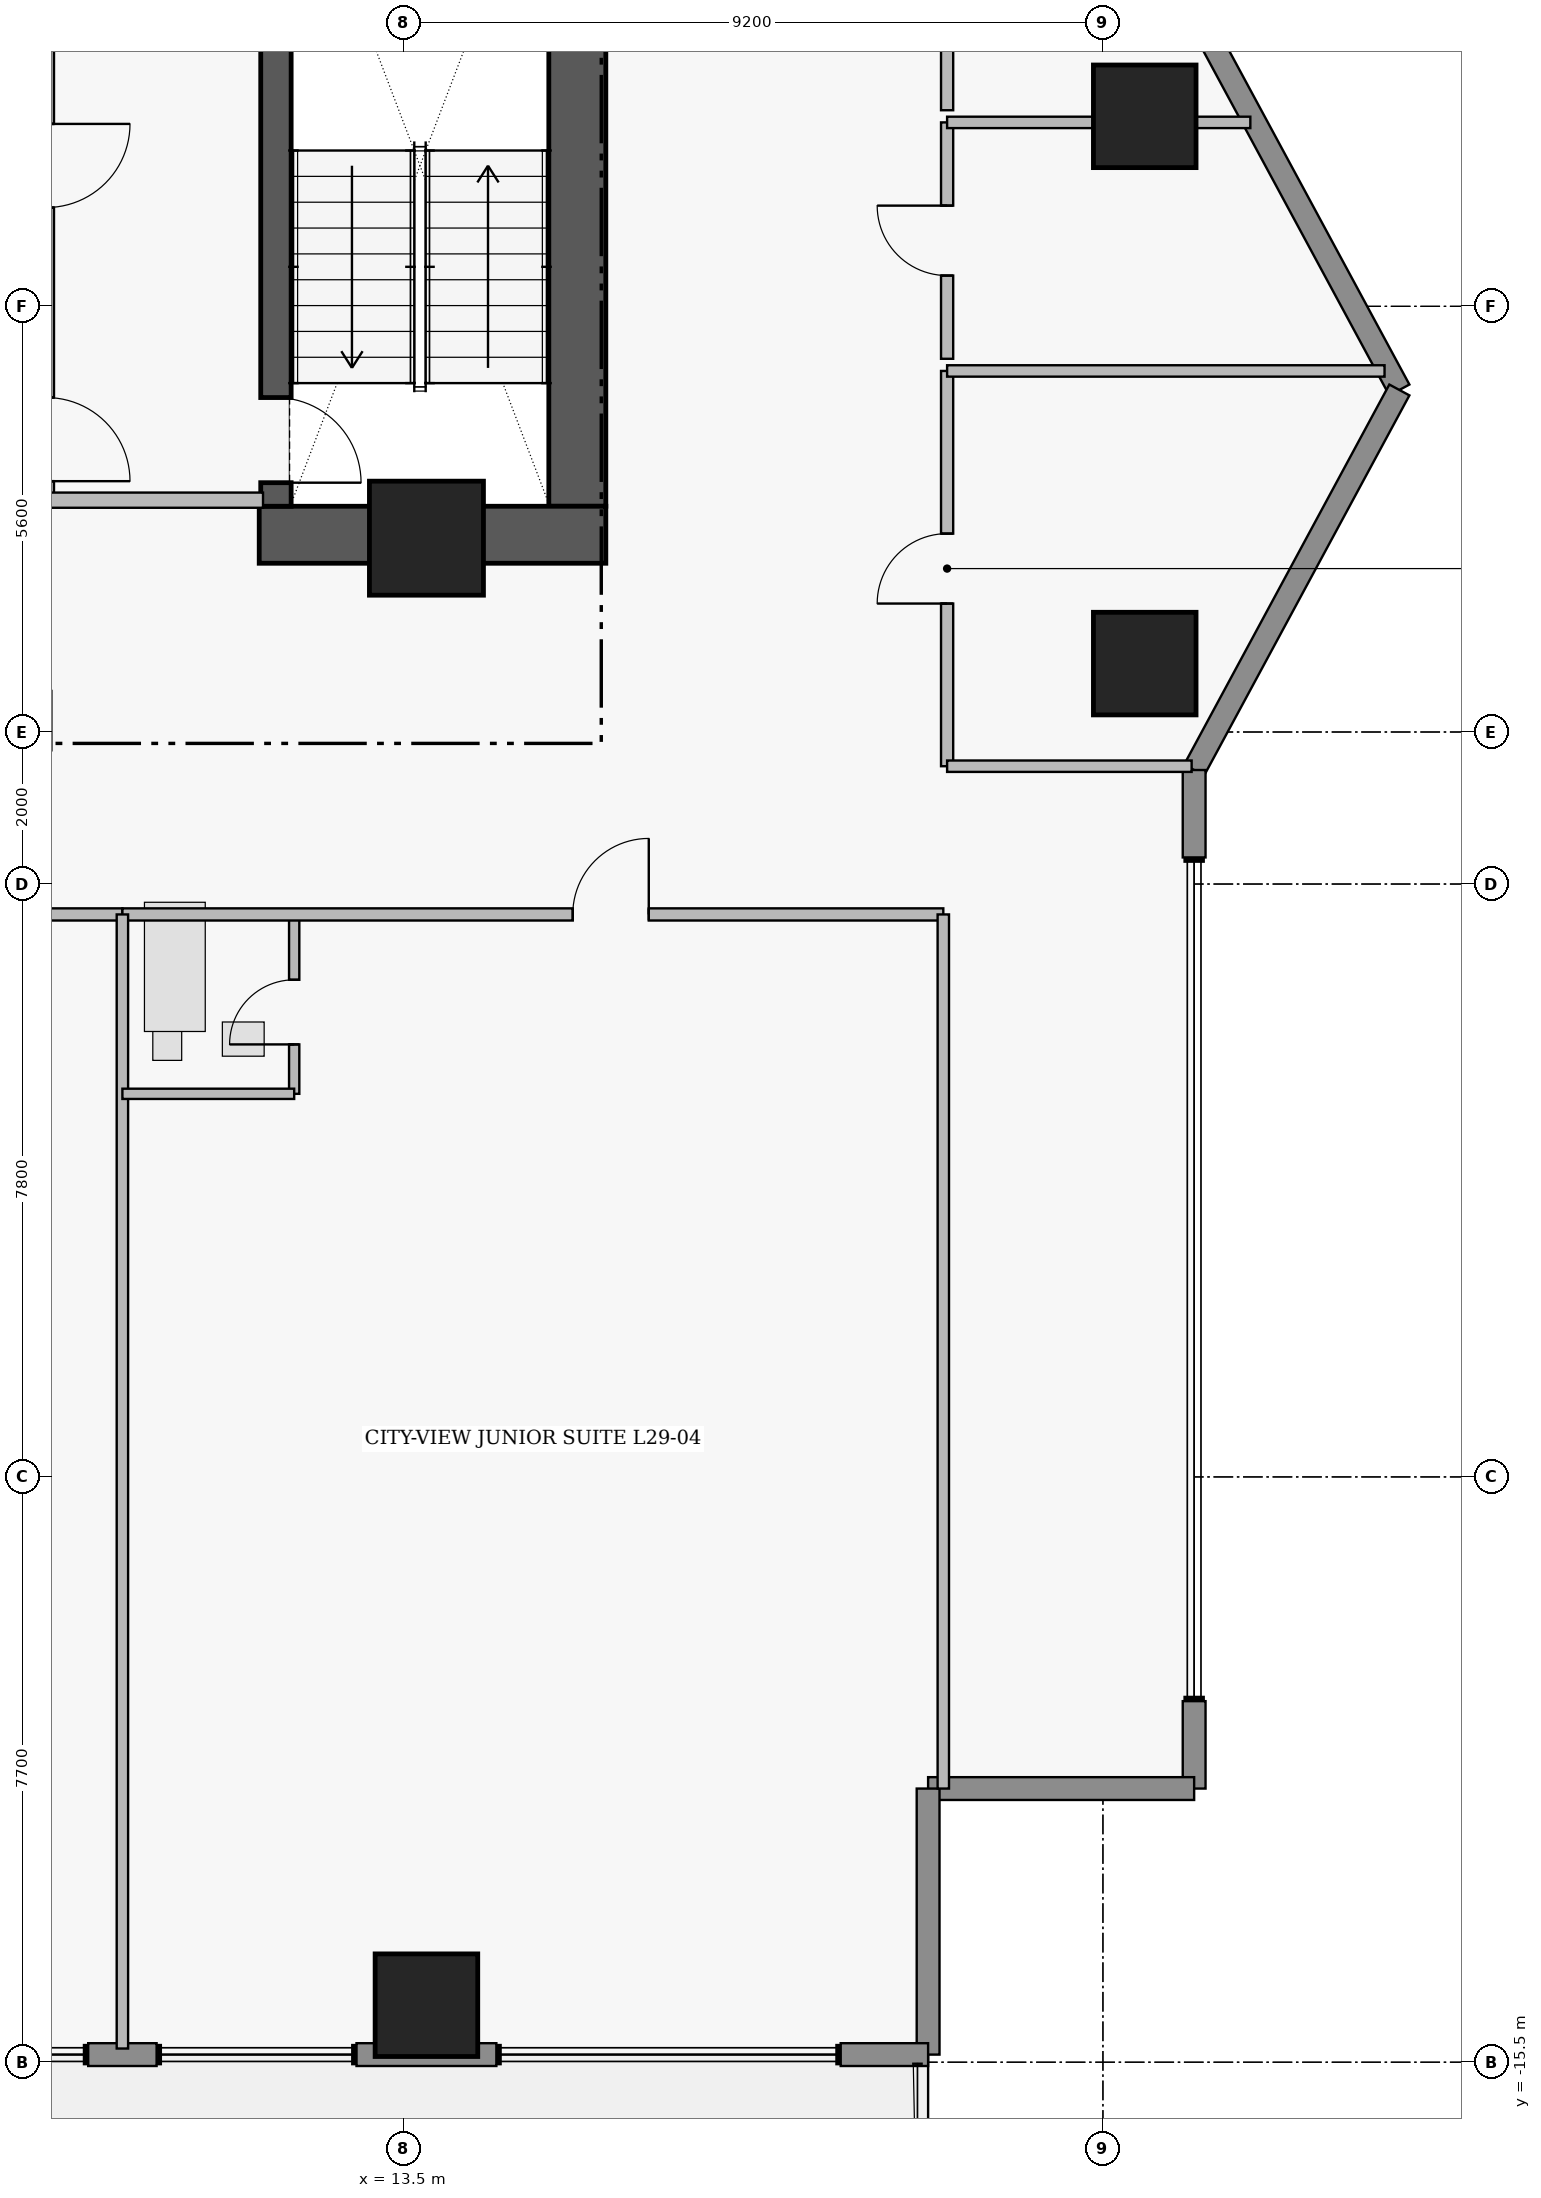
"""IFC4 building model, lengths in metres.
Left out: names, types, materials, properties, quantities, classifications, styles, units other than length and angle.
Written with IfcOpenShell. Run it as: python <this file> out.ifc"""

import sys

from ifc_helpers import new_model, si_unit, direction, frame, frame_2d, origin, origin_2d, place, context, subcontext, project, spatial, rectangle, extrude, element, fill, save


model = new_model("IFC4")
c1 = context("Model", 3, precision=1e-05, world=origin(), true_north=direction((0.0, 1.0)))
c2 = subcontext(c1, "Body", "Model", "MODEL_VIEW")
j1 = project(units=[si_unit("LENGTHUNIT", "METRE"), si_unit("PLANEANGLEUNIT", "RADIAN")], contexts=[c1])
p1 = place(None, origin())
s1 = spatial("IfcSite", under=j1, at=p1, CompositionType="ELEMENT")
p2 = place(p1, origin())
s2 = spatial("IfcBuilding", under=s1, at=p2, CompositionType="ELEMENT")
p3 = place(p2, frame((0.0, 0.0, 117.55)))
s3 = spatial("IfcBuildingStorey", under=s2, at=p3, CompositionType="ELEMENT", Elevation=117.55)
p4 = place(p3, frame((15.785, 4.97, 0.0), z_axis=(0.0, 0.0, 1.0), x_axis=(0.0, 1.0, 0.0)))
e1 = element("IfcWall", 1, at=p4, inside=s3, PredefinedType="SHEAR", context=c2, shape_type="SweptSolid", body=[
    extrude(rectangle(XDim=8.96, YDim=0.75, at=frame_2d((4.48, 0.0))), origin(), (0.0, 0.0, 1.0), 3.46),
])
p5 = place(p3, frame((11.6, 4.595, 0.0), z_axis=(0.0, 0.0, 1.0), x_axis=(1.0, 0.0, 0.0)))
e2 = element("IfcWall", 2, at=p5, inside=s3, PredefinedType="SHEAR", context=c2, shape_type="SweptSolid", body=[
    extrude(rectangle(XDim=4.56, YDim=0.75, at=frame_2d((2.28, 0.0))), origin(), (0.0, 0.0, 1.0), 3.46),
])
p6 = place(p3, frame((11.82, 13.93, 0.0), z_axis=(0.0, 0.0, 1.0), x_axis=(0.0, -1.0, 0.0)))
e3 = element("IfcWall", 3, at=p6, inside=s3, PredefinedType="SHEAR", context=c2, shape_type="SweptSolid", body=[
    extrude(rectangle(XDim=8.96, YDim=0.4, at=frame_2d((4.48, 0.0))), origin(), (0.0, 0.0, 1.0), 3.46),
])
p7 = place(p6, frame((7.53, 0.0, 0.0)))
e4 = element("IfcOpeningElement", 4, at=p7, cuts=e3, PredefinedType="OPENING", context=c2, shape_type="SweptSolid", body=[
    extrude(rectangle(XDim=1.12, YDim=2.22, at=frame_2d((0.56, 1.11))), frame((0.0, 0.21, 0.0), z_axis=(0.0, -1.0, 0.0), x_axis=(1.0, 0.0, 0.0)), (0.0, 0.0, 1.0), 0.42),
])
p8 = place(p3, frame((13.8, 4.55, 0.0), z_axis=(0.0, 0.0, 1.0), x_axis=(1.0, 0.0, 0.0)))
e5 = element("IfcColumn", 5, at=p8, inside=s3, PredefinedType="COLUMN", context=c2, shape_type="SweptSolid", body=[
    extrude(rectangle(XDim=1.5, YDim=1.5, at=origin_2d()), origin(), (0.0, 0.0, 1.0), 3.65),
])
for number, where, z_axis, x_axis in (
    (6, (13.8, -14.75, 0.0), (0.0, 0.0, 1.0), (1.0, 0.0, 0.0)),
    (7, (23.25, 2.9, 0.0), (0.0, 0.0, 1.0), (1.0, 0.0, 0.0)),
    (8, (23.25, 10.1, 0.0), (0.0, 0.0, 1.0), (1.0, 0.0, 0.0)),
):
    element("IfcColumn", number, at=place(p3, frame(where, z_axis=z_axis, x_axis=x_axis)), inside=s3, PredefinedType="COLUMN", context=c2, shape_type="SweptSolid", body=[
        extrude(rectangle(XDim=1.35, YDim=1.35, at=origin_2d()), origin(), (0.0, 0.0, 1.0), 3.65),
    ])
for number, where, z_axis, x_axis in (
    (9, (23.9, 11.5, 0.0), (0.0, 0.0, 1.0), (0.475, -0.88, 0.0)),
    (10, (26.6, 6.5, 0.0), (0.0, 0.0, 1.0), (-0.475, -0.88, 0.0)),
):
    element("IfcWall", number, at=place(p3, frame(where, z_axis=z_axis, x_axis=x_axis)), inside=s3, PredefinedType="STANDARD", context=c2, shape_type="SweptSolid", body=[
        extrude(rectangle(XDim=5.683, YDim=0.3, at=frame_2d((2.841, 0.0))), origin(), (0.0, 0.0, 1.0), 3.43),
    ])
for number, where, z_axis, x_axis in (
    (11, (23.9, 1.5, 0.0), (0.0, 0.0, 1.0), (0.0, -1.0, 0.0)),
    (12, (23.9, -10.75, 0.0), (0.0, 0.0, 1.0), (0.0, -1.0, 0.0)),
):
    element("IfcWall", number, at=place(p3, frame(where, z_axis=z_axis, x_axis=x_axis)), inside=s3, PredefinedType="STANDARD", context=c2, shape_type="SweptSolid", body=[
        extrude(rectangle(XDim=1.15, YDim=0.3, at=frame_2d((0.575, 0.0))), origin(), (0.0, 0.0, 1.0), 3.43),
    ])
for number, where, z_axis, x_axis in (
    (13, (23.9, -11.9, 0.0), (0.0, 0.0, 1.0), (-1.0, 0.0, 0.0)),
    (14, (20.4, -11.9, 0.0), (0.0, 0.0, 1.0), (0.0, -1.0, 0.0)),
):
    element("IfcWall", number, at=place(p3, frame(where, z_axis=z_axis, x_axis=x_axis)), inside=s3, PredefinedType="STANDARD", context=c2, shape_type="SweptSolid", body=[
        extrude(rectangle(XDim=3.5, YDim=0.3, at=frame_2d((1.75, 0.0))), origin(), (0.0, 0.0, 1.0), 3.43),
    ])
p9 = place(p3, frame((20.4, -15.4, 0.0), z_axis=(0.0, 0.0, 1.0), x_axis=(-1.0, 0.0, 0.0)))
e15 = element("IfcWall", 15, at=p9, inside=s3, PredefinedType="STANDARD", context=c2, shape_type="SweptSolid", body=[
    extrude(rectangle(XDim=1.15, YDim=0.3, at=frame_2d((0.575, 0.0))), origin(), (0.0, 0.0, 1.0), 3.43),
])
p10 = place(p3, frame((14.72, -15.4, 0.0), z_axis=(0.0, 0.0, 1.0), x_axis=(-1.0, 0.0, 0.0)))
e16 = element("IfcWall", 16, at=p10, inside=s3, PredefinedType="STANDARD", context=c2, shape_type="SweptSolid", body=[
    extrude(rectangle(XDim=1.84, YDim=0.3, at=frame_2d((0.92, 0.0))), origin(), (0.0, 0.0, 1.0), 3.43),
])
p11 = place(p3, frame((10.25, -15.4, 0.0), z_axis=(0.0, 0.0, 1.0), x_axis=(-1.0, 0.0, 0.0)))
e17 = element("IfcWall", 17, at=p11, inside=s3, PredefinedType="STANDARD", context=c2, shape_type="SweptSolid", body=[
    extrude(rectangle(XDim=0.9, YDim=0.3, at=frame_2d((0.45, 0.0))), origin(), (0.0, 0.0, 1.0), 3.43),
])
p12 = place(p3, frame((8.8, 11.15, 0.0), z_axis=(0.0, 0.0, 1.0), x_axis=(0.0, -1.0, 0.0)))
e18 = element("IfcWall", 18, at=p12, inside=s3, PredefinedType="PARTITIONING", context=c2, shape_type="SweptSolid", body=[
    extrude(rectangle(XDim=6.1, YDim=0.2, at=frame_2d((3.05, 0.0))), origin(), (0.0, 0.0, 1.0), 3.43),
])
p13 = place(p12, frame((1.15, 0.0, 0.0)))
e19 = element("IfcOpeningElement", 19, at=p13, cuts=e18, PredefinedType="OPENING", context=c2, shape_type="SweptSolid", body=[
    extrude(rectangle(XDim=1.1, YDim=2.2, at=frame_2d((0.55, 1.1))), frame((0.0, 0.11, 0.0), z_axis=(0.0, -1.0, 0.0), x_axis=(1.0, 0.0, 0.0)), (0.0, 0.0, 1.0), 0.22),
])
p14 = place(p12, frame((4.75, 0.0, 0.0)))
e20 = element("IfcOpeningElement", 20, at=p14, cuts=e18, PredefinedType="OPENING", context=c2, shape_type="SweptSolid", body=[
    extrude(rectangle(XDim=1.1, YDim=2.2, at=frame_2d((0.55, 1.1))), frame((0.0, 0.11, 0.0), z_axis=(0.0, -1.0, 0.0), x_axis=(1.0, 0.0, 0.0)), (0.0, 0.0, 1.0), 0.22),
])
p15 = place(p3, frame((0.4, -0.4, 0.0), z_axis=(0.0, 0.0, 1.0), x_axis=(1.0, 0.0, 0.0)))
e21 = element("IfcWall", 21, at=p15, inside=s3, PredefinedType="PARTITIONING", context=c2, shape_type="SweptSolid", body=[
    extrude(rectangle(XDim=9.4, YDim=0.16, at=frame_2d((4.7, 0.0))), origin(), (0.0, 0.0, 1.0), 3.43),
])
p16 = place(p15, frame((5.35, 0.0, 0.0)))
e22 = element("IfcOpeningElement", 22, at=p16, cuts=e21, PredefinedType="OPENING", context=c2, shape_type="SweptSolid", body=[
    extrude(rectangle(XDim=1.0, YDim=2.15, at=frame_2d((0.5, 1.075))), frame((0.0, 0.09, 0.0), z_axis=(0.0, -1.0, 0.0), x_axis=(1.0, 0.0, 0.0)), (0.0, 0.0, 1.0), 0.18),
])
p17 = place(p3, frame((12.06, -2.76, 0.0), z_axis=(0.0, 0.0, 1.0), x_axis=(0.0, 1.0, 0.0)))
e23 = element("IfcWall", 23, at=p17, inside=s3, PredefinedType="PLUMBINGWALL", context=c2, shape_type="SweptSolid", body=[
    extrude(rectangle(XDim=2.36, YDim=0.135, at=frame_2d((1.18, 0.0))), origin(), (0.0, 0.0, 1.0), 3.43),
])
p18 = place(p17, frame((0.65, 0.0, 0.0)))
e24 = element("IfcOpeningElement", 24, at=p18, cuts=e23, PredefinedType="OPENING", context=c2, shape_type="SweptSolid", body=[
    extrude(rectangle(XDim=0.85, YDim=2.1, at=frame_2d((0.425, 1.05))), frame((0.0, 0.077, 0.0), z_axis=(0.0, -1.0, 0.0), x_axis=(1.0, 0.0, 0.0)), (0.0, 0.0, 1.0), 0.155),
])
p19 = place(p3, frame((9.8, -0.4, 0.0), z_axis=(0.0, 0.0, 1.0), x_axis=(1.0, 0.0, 0.0)))
e25 = element("IfcWall", 25, at=p19, inside=s3, PredefinedType="PARTITIONING", context=c2, shape_type="SweptSolid", body=[
    extrude(rectangle(XDim=10.8, YDim=0.16, at=frame_2d((5.4, 0.0))), origin(), (0.0, 0.0, 1.0), 3.43),
])
p20 = place(p19, frame((5.925, 0.0, 0.0)))
e26 = element("IfcOpeningElement", 26, at=p20, cuts=e25, PredefinedType="OPENING", context=c2, shape_type="SweptSolid", body=[
    extrude(rectangle(XDim=1.0, YDim=2.15, at=frame_2d((0.5, 1.075))), frame((0.0, 0.09, 0.0), z_axis=(0.0, -1.0, 0.0), x_axis=(1.0, 0.0, 0.0)), (0.0, 0.0, 1.0), 0.18),
])
p21 = place(p3, frame((20.65, 1.55, 0.0), z_axis=(0.0, 0.0, 1.0), x_axis=(0.0, 1.0, 0.0)))
e27 = element("IfcWall", 27, at=p21, inside=s3, PredefinedType="PARTITIONING", context=c2, shape_type="SweptSolid", body=[
    extrude(rectangle(XDim=5.2, YDim=0.16, at=frame_2d((2.6, 0.0))), origin(), (0.0, 0.0, 1.0), 3.43),
])
p22 = place(p21, frame((2.14, 0.0, 0.0)))
e28 = element("IfcOpeningElement", 28, at=p22, cuts=e27, PredefinedType="OPENING", context=c2, shape_type="SweptSolid", body=[
    extrude(rectangle(XDim=0.92, YDim=2.12, at=frame_2d((0.46, 1.06))), frame((0.0, 0.09, 0.0), z_axis=(0.0, -1.0, 0.0), x_axis=(1.0, 0.0, 0.0)), (0.0, 0.0, 1.0), 0.18),
])
p23 = place(p3, frame((20.65, 6.91, 0.0), z_axis=(0.0, 0.0, 1.0), x_axis=(0.0, 1.0, 0.0)))
e29 = element("IfcWall", 29, at=p23, inside=s3, PredefinedType="PARTITIONING", context=c2, shape_type="SweptSolid", body=[
    extrude(rectangle(XDim=3.11, YDim=0.16, at=frame_2d((1.555, 0.0))), origin(), (0.0, 0.0, 1.0), 3.43),
])
p24 = place(p23, frame((1.095, 0.0, 0.0)))
e30 = element("IfcOpeningElement", 30, at=p24, cuts=e29, PredefinedType="OPENING", context=c2, shape_type="SweptSolid", body=[
    extrude(rectangle(XDim=0.92, YDim=2.12, at=frame_2d((0.46, 1.06))), frame((0.0, 0.09, 0.0), z_axis=(0.0, -1.0, 0.0), x_axis=(1.0, 0.0, 0.0)), (0.0, 0.0, 1.0), 0.18),
])
p25 = place(p3, frame((20.65, 10.18, 0.0), z_axis=(0.0, 0.0, 1.0), x_axis=(0.0, 1.0, 0.0)))
e31 = element("IfcWall", 31, at=p25, inside=s3, PredefinedType="PARTITIONING", context=c2, shape_type="SweptSolid", body=[
    extrude(rectangle(XDim=4.67, YDim=0.16, at=frame_2d((2.335, 0.0))), origin(), (0.0, 0.0, 1.0), 3.43),
])
p26 = place(p25, frame((1.875, 0.0, 0.0)))
e32 = element("IfcOpeningElement", 32, at=p26, cuts=e31, PredefinedType="OPENING", context=c2, shape_type="SweptSolid", body=[
    extrude(rectangle(XDim=0.92, YDim=2.12, at=frame_2d((0.46, 1.06))), frame((0.0, 0.09, 0.0), z_axis=(0.0, -1.0, 0.0), x_axis=(1.0, 0.0, 0.0)), (0.0, 0.0, 1.0), 0.18),
])
p27 = place(p3, frame((8.8, 5.05, 0.0), z_axis=(0.0, 0.0, 1.0), x_axis=(1.0, 0.0, 0.0)))
e33 = element("IfcWall", 33, at=p27, inside=s3, PredefinedType="PARTITIONING", context=c2, shape_type="SweptSolid", body=[
    extrude(rectangle(XDim=2.85, YDim=0.2, at=frame_2d((1.425, 0.0))), origin(), (0.0, 0.0, 1.0), 3.43),
])
p28 = place(p3, frame((9.8, -15.32, 0.0), z_axis=(0.0, 0.0, 1.0), x_axis=(0.0, 1.0, 0.0)))
e34 = element("IfcWall", 34, at=p28, inside=s3, PredefinedType="PARTITIONING", context=c2, shape_type="SweptSolid", body=[
    extrude(rectangle(XDim=14.92, YDim=0.15, at=frame_2d((7.46, 0.0))), origin(), (0.0, 0.0, 1.0), 3.43),
])
p29 = place(p3, frame((9.8, -2.76, 0.0), z_axis=(0.0, 0.0, 1.0), x_axis=(1.0, 0.0, 0.0)))
e35 = element("IfcWall", 35, at=p29, inside=s3, PredefinedType="PLUMBINGWALL", context=c2, shape_type="SweptSolid", body=[
    extrude(rectangle(XDim=2.26, YDim=0.135, at=frame_2d((1.13, 0.0))), origin(), (0.0, 0.0, 1.0), 3.43),
])
p30 = place(p3, frame((20.6, -11.9, 0.0), z_axis=(0.0, 0.0, 1.0), x_axis=(0.0, 1.0, 0.0)))
e36 = element("IfcWall", 36, at=p30, inside=s3, PredefinedType="PARTITIONING", context=c2, shape_type="SweptSolid", body=[
    extrude(rectangle(XDim=11.5, YDim=0.15, at=frame_2d((5.75, 0.0))), origin(), (0.0, 0.0, 1.0), 3.43),
])
p31 = place(p3, frame((20.65, 1.55, 0.0), z_axis=(0.0, 0.0, 1.0), x_axis=(1.0, 0.0, 0.0)))
e37 = element("IfcWall", 37, at=p31, inside=s3, PredefinedType="PARTITIONING", context=c2, shape_type="SweptSolid", body=[
    extrude(rectangle(XDim=3.217, YDim=0.15, at=frame_2d((1.608, 0.0))), origin(), (0.0, 0.0, 1.0), 3.43),
])
p32 = place(p3, frame((20.65, 6.75, 0.0), z_axis=(0.0, 0.0, 1.0), x_axis=(1.0, 0.0, 0.0)))
e38 = element("IfcWall", 38, at=p32, inside=s3, PredefinedType="PARTITIONING", context=c2, shape_type="SweptSolid", body=[
    extrude(rectangle(XDim=5.755, YDim=0.15, at=frame_2d((2.877, 0.0))), origin(), (0.0, 0.0, 1.0), 3.43),
])
p33 = place(p3, frame((20.65, 10.02, 0.0), z_axis=(0.0, 0.0, 1.0), x_axis=(1.0, 0.0, 0.0)))
e39 = element("IfcWall", 39, at=p33, inside=s3, PredefinedType="PARTITIONING", context=c2, shape_type="SweptSolid", body=[
    extrude(rectangle(XDim=3.989, YDim=0.15, at=frame_2d((1.995, 0.0))), origin(), (0.0, 0.0, 1.0), 3.43),
])
p34 = place(p7, origin())
e40 = element("IfcDoor", 40, at=p34, inside=s3, OperationType="SINGLE_SWING_RIGHT", PredefinedType="DOOR", context=c2, shape_type="SweptSolid", body=[
    extrude(rectangle(XDim=1.12, YDim=2.22, at=frame_2d((0.56, 1.11))), frame((0.0, 0.025, 0.0), z_axis=(0.0, -1.0, 0.0), x_axis=(1.0, 0.0, 0.0)), (0.0, 0.0, 1.0), 0.05),
])
fill(e4, e40)
p35 = place(p18, origin())
e41 = element("IfcDoor", 41, at=p35, inside=s3, OperationType="SINGLE_SWING_LEFT", PredefinedType="DOOR", context=c2, shape_type="SweptSolid", body=[
    extrude(rectangle(XDim=0.85, YDim=2.1, at=frame_2d((0.425, 1.05))), frame((0.0, 0.025, 0.0), z_axis=(0.0, -1.0, 0.0), x_axis=(1.0, 0.0, 0.0)), (0.0, 0.0, 1.0), 0.05),
])
fill(e24, e41)
p36 = place(p20, origin())
e42 = element("IfcDoor", 42, at=p36, inside=s3, OperationType="SINGLE_SWING_RIGHT", PredefinedType="DOOR", context=c2, shape_type="SweptSolid", body=[
    extrude(rectangle(XDim=1.0, YDim=2.15, at=frame_2d((0.5, 1.075))), frame((0.0, 0.025, 0.0), z_axis=(0.0, -1.0, 0.0), x_axis=(1.0, 0.0, 0.0)), (0.0, 0.0, 1.0), 0.05),
])
fill(e26, e42)
p37 = place(p22, origin())
e43 = element("IfcDoor", 43, at=p37, inside=s3, OperationType="SINGLE_SWING_LEFT", PredefinedType="DOOR", context=c2, shape_type="SweptSolid", body=[
    extrude(rectangle(XDim=0.92, YDim=2.12, at=frame_2d((0.46, 1.06))), frame((0.0, 0.025, 0.0), z_axis=(0.0, -1.0, 0.0), x_axis=(1.0, 0.0, 0.0)), (0.0, 0.0, 1.0), 0.05),
])
fill(e28, e43)
p38 = place(p24, origin())
e44 = element("IfcDoor", 44, at=p38, inside=s3, OperationType="SINGLE_SWING_RIGHT", PredefinedType="DOOR", context=c2, shape_type="SweptSolid", body=[
    extrude(rectangle(XDim=0.92, YDim=2.12, at=frame_2d((0.46, 1.06))), frame((0.0, 0.025, 0.0), z_axis=(0.0, -1.0, 0.0), x_axis=(1.0, 0.0, 0.0)), (0.0, 0.0, 1.0), 0.05),
])
fill(e30, e44)
save(model, sys.argv[1])
